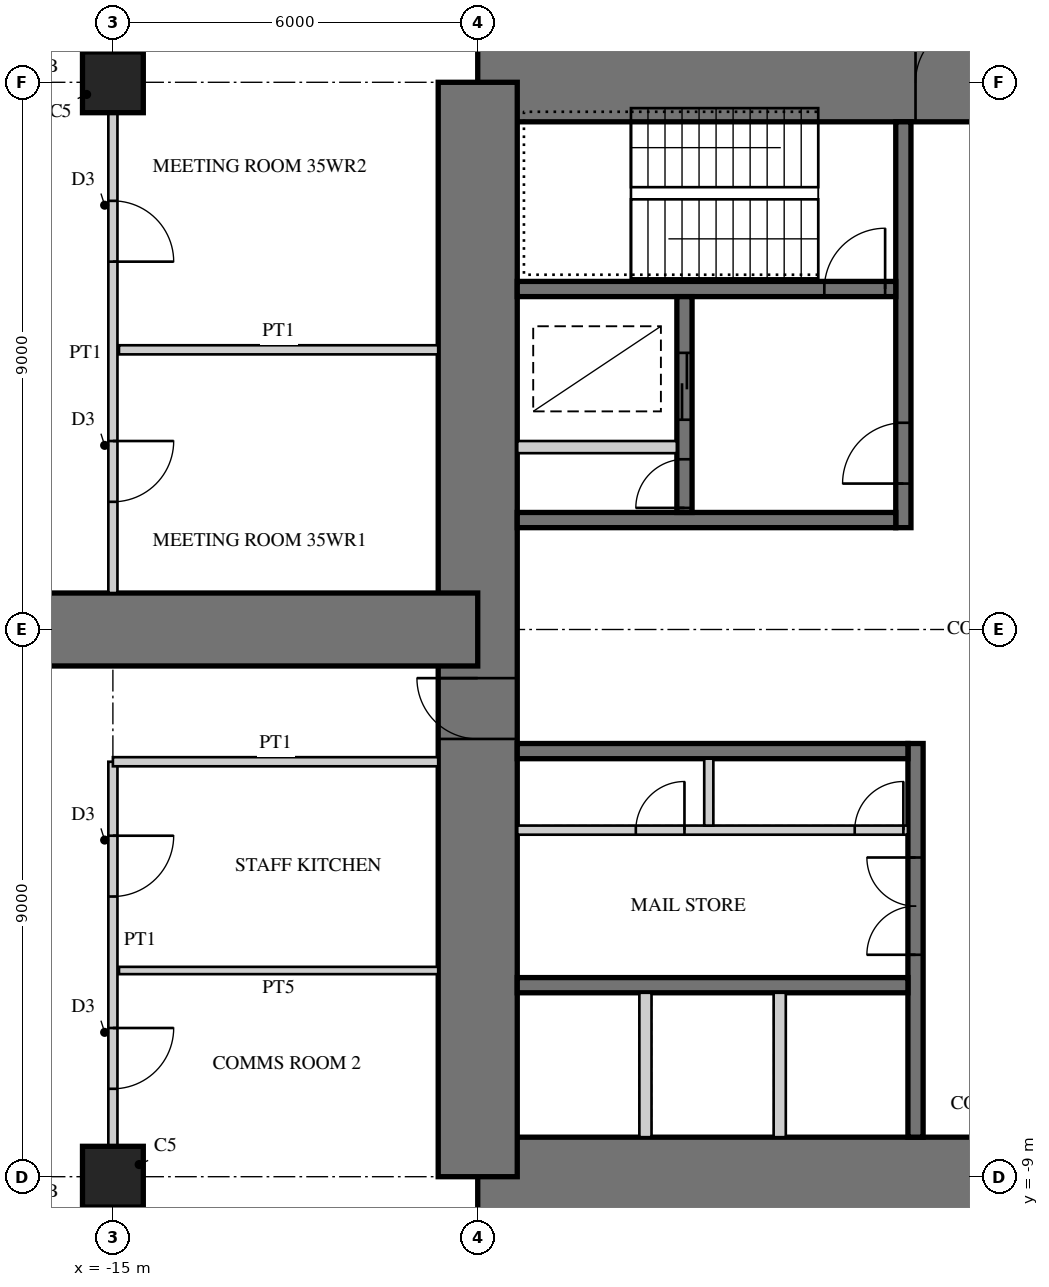
"""IFC4 building model, lengths in metres.
Left out: names, types, materials, properties, quantities, classifications, styles, units other than length and angle.
Written with IfcOpenShell. Run it as: python <this file> out.ifc"""

import sys

from ifc_helpers import new_model, si_unit, direction, frame, frame_2d, origin, origin_2d, place, context, subcontext, project, spatial, rectangle, extrude, element, fill, save


model = new_model("IFC4")
c1 = context("Model", 3, precision=1e-05, world=origin(), true_north=direction((0.0, 1.0)))
c2 = subcontext(c1, "Body", "Model", "MODEL_VIEW")
j1 = project(units=[si_unit("LENGTHUNIT", "METRE"), si_unit("PLANEANGLEUNIT", "RADIAN")], contexts=[c1])
p1 = place(None, origin())
s1 = spatial("IfcSite", under=j1, at=p1, CompositionType="ELEMENT")
p2 = place(p1, origin())
s2 = spatial("IfcBuilding", under=s1, at=p2, CompositionType="ELEMENT")
p3 = place(p2, frame((0.0, 0.0, 144.5)))
s3 = spatial("IfcBuildingStorey", under=s2, at=p3, CompositionType="ELEMENT", Elevation=144.5)
p4 = place(p3, frame((9.0, 9.0, 0.0), z_axis=(0.0, 0.0, 1.0), x_axis=(-1.0, 0.0, 0.0)))
e1 = element("IfcWall", 1, at=p4, inside=s3, PredefinedType="SHEAR", context=c2, shape_type="SweptSolid", body=[
    extrude(rectangle(XDim=18.0, YDim=1.3, at=frame_2d((9.0, 0.0))), origin(), (0.0, 0.0, 1.0), 4.0),
])
p5 = place(p4, frame((9.8, 0.0, 0.0)))
e2 = element("IfcOpeningElement", 2, at=p5, cuts=e1, PredefinedType="OPENING", context=c2, shape_type="SweptSolid", body=[
    extrude(rectangle(XDim=1.0, YDim=2.4, at=frame_2d((0.5, 1.2))), frame((0.0, 0.66, 0.0), z_axis=(0.0, -1.0, 0.0), x_axis=(1.0, 0.0, 0.0)), (0.0, 0.0, 1.0), 1.32),
])
p6 = place(p3, frame((-9.0, -9.0, 0.0), z_axis=(0.0, 0.0, 1.0), x_axis=(1.0, 0.0, 0.0)))
e3 = element("IfcWall", 3, at=p6, inside=s3, PredefinedType="SHEAR", context=c2, shape_type="SweptSolid", body=[
    extrude(rectangle(XDim=18.0, YDim=1.3, at=frame_2d((9.0, 0.0))), origin(), (0.0, 0.0, 1.0), 4.0),
])
p7 = place(p6, frame((9.8, 0.0, 0.0)))
e4 = element("IfcOpeningElement", 4, at=p7, cuts=e3, PredefinedType="OPENING", context=c2, shape_type="SweptSolid", body=[
    extrude(rectangle(XDim=1.0, YDim=2.4, at=frame_2d((0.5, 1.2))), frame((0.0, 0.66, 0.0), z_axis=(0.0, -1.0, 0.0), x_axis=(1.0, 0.0, 0.0)), (0.0, 0.0, 1.0), 1.32),
])
p8 = place(p3, frame((-9.0, 9.0, 0.0), z_axis=(0.0, 0.0, 1.0), x_axis=(0.0, -1.0, 0.0)))
e5 = element("IfcWall", 5, at=p8, inside=s3, PredefinedType="SHEAR", context=c2, shape_type="SweptSolid", body=[
    extrude(rectangle(XDim=18.0, YDim=1.3, at=frame_2d((9.0, 0.0))), origin(), (0.0, 0.0, 1.0), 4.0),
])
p9 = place(p8, frame((9.8, 0.0, 0.0)))
e6 = element("IfcOpeningElement", 6, at=p9, cuts=e5, PredefinedType="OPENING", context=c2, shape_type="SweptSolid", body=[
    extrude(rectangle(XDim=1.0, YDim=2.4, at=frame_2d((0.5, 1.2))), frame((0.0, 0.66, 0.0), z_axis=(0.0, -1.0, 0.0), x_axis=(1.0, 0.0, 0.0)), (0.0, 0.0, 1.0), 1.32),
])
p10 = place(p3, frame((-2.0, 1.675, 0.0), z_axis=(0.0, 0.0, 1.0), x_axis=(0.0, 1.0, 0.0)))
e7 = element("IfcWall", 7, at=p10, inside=s3, PredefinedType="SHEAR", context=c2, shape_type="SweptSolid", body=[
    extrude(rectangle(XDim=6.675, YDim=0.25, at=frame_2d((3.337, 0.0))), origin(), (0.0, 0.0, 1.0), 4.0),
])
p11 = place(p10, frame((0.725, 0.0, 0.0)))
e8 = element("IfcOpeningElement", 8, at=p11, cuts=e7, PredefinedType="OPENING", context=c2, shape_type="SweptSolid", body=[
    extrude(rectangle(XDim=1.0, YDim=2.1, at=frame_2d((0.5, 1.05))), frame((0.0, 0.135, 0.0), z_axis=(0.0, -1.0, 0.0), x_axis=(1.0, 0.0, 0.0)), (0.0, 0.0, 1.0), 0.27),
])
p12 = place(p3, frame((-2.125, 1.8, 0.0), z_axis=(0.0, 0.0, 1.0), x_axis=(-1.0, 0.0, 0.0)))
e9 = element("IfcWall", 9, at=p12, inside=s3, PredefinedType="SHEAR", context=c2, shape_type="SweptSolid", body=[
    extrude(rectangle(XDim=6.225, YDim=0.25, at=frame_2d((3.113, 0.0))), origin(), (0.0, 0.0, 1.0), 4.0),
])
p13 = place(p3, frame((-2.125, 5.6, 0.0), z_axis=(0.0, 0.0, 1.0), x_axis=(-1.0, 0.0, 0.0)))
e10 = element("IfcWall", 10, at=p13, inside=s3, PredefinedType="SHEAR", context=c2, shape_type="SweptSolid", body=[
    extrude(rectangle(XDim=6.225, YDim=0.25, at=frame_2d((3.113, 0.0))), origin(), (0.0, 0.0, 1.0), 4.0),
])
p14 = place(p13, frame((0.175, 0.0, 0.0)))
e11 = element("IfcOpeningElement", 11, at=p14, cuts=e10, PredefinedType="OPENING", context=c2, shape_type="SweptSolid", body=[
    extrude(rectangle(XDim=1.0, YDim=2.1, at=frame_2d((0.5, 1.05))), frame((0.0, 0.135, 0.0), z_axis=(0.0, -1.0, 0.0), x_axis=(1.0, 0.0, 0.0)), (0.0, 0.0, 1.0), 0.27),
])
p15 = place(p3, frame((-5.6, 1.925, 0.0), z_axis=(0.0, 0.0, 1.0), x_axis=(0.0, 1.0, 0.0)))
e12 = element("IfcWall", 12, at=p15, inside=s3, PredefinedType="SHEAR", context=c2, shape_type="SweptSolid", body=[
    extrude(rectangle(XDim=3.55, YDim=0.25, at=frame_2d((1.775, 0.0))), origin(), (0.0, 0.0, 1.0), 4.0),
])
p16 = place(p15, frame((1.525, 0.0, 0.0)))
e13 = element("IfcOpeningElement", 13, at=p16, cuts=e12, PredefinedType="OPENING", context=c2, shape_type="SweptSolid", body=[
    extrude(rectangle(XDim=1.1, YDim=2.2, at=frame_2d((0.55, 1.1))), frame((0.0, 0.135, 0.0), z_axis=(0.0, -1.0, 0.0), x_axis=(1.0, 0.0, 0.0)), (0.0, 0.0, 1.0), 0.27),
])
p17 = place(p15, frame((0.075, 0.0, 0.0)))
e14 = element("IfcOpeningElement", 14, at=p17, cuts=e12, PredefinedType="OPENING", context=c2, shape_type="SweptSolid", body=[
    extrude(rectangle(XDim=0.8, YDim=2.1, at=frame_2d((0.4, 1.05))), frame((0.0, 0.135, 0.0), z_axis=(0.0, -1.0, 0.0), x_axis=(1.0, 0.0, 0.0)), (0.0, 0.0, 1.0), 0.27),
])
p18 = place(p3, frame((-5.725, 3.0, 0.0), z_axis=(0.0, 0.0, 1.0), x_axis=(-1.0, 0.0, 0.0)))
e15 = element("IfcWall", 15, at=p18, inside=s3, PredefinedType="PARTITIONING", context=c2, shape_type="SweptSolid", body=[
    extrude(rectangle(XDim=2.625, YDim=0.2, at=frame_2d((1.312, 0.0))), origin(), (0.0, 0.0, 1.0), 4.0),
])
p19 = place(p3, frame((-1.8, -1.875, 0.0), z_axis=(0.0, 0.0, 1.0), x_axis=(0.0, -1.0, 0.0)))
e16 = element("IfcWall", 16, at=p19, inside=s3, PredefinedType="SHEAR", context=c2, shape_type="SweptSolid", body=[
    extrude(rectangle(XDim=6.475, YDim=0.25, at=frame_2d((3.238, 0.0))), origin(), (0.0, 0.0, 1.0), 4.0),
])
p20 = place(p19, frame((1.875, 0.0, 0.0)))
e17 = element("IfcOpeningElement", 17, at=p20, cuts=e16, PredefinedType="OPENING", context=c2, shape_type="SweptSolid", body=[
    extrude(rectangle(XDim=1.6, YDim=2.4, at=frame_2d((0.8, 1.2))), frame((0.0, 0.135, 0.0), z_axis=(0.0, -1.0, 0.0), x_axis=(1.0, 0.0, 0.0)), (0.0, 0.0, 1.0), 0.27),
])
for number, where, z_axis, x_axis in (
    (18, (-1.925, -2.0, 0.0), (0.0, 0.0, 1.0), (-1.0, 0.0, 0.0)),
    (19, (-1.925, -5.85, 0.0), (0.0, 0.0, 1.0), (-1.0, 0.0, 0.0)),
):
    element("IfcWall", number, at=place(p3, frame(where, z_axis=z_axis, x_axis=x_axis)), inside=s3, PredefinedType="SHEAR", context=c2, shape_type="SweptSolid", body=[
        extrude(rectangle(XDim=6.425, YDim=0.25, at=frame_2d((3.212, 0.0))), origin(), (0.0, 0.0, 1.0), 4.0),
    ])
p21 = place(p3, frame((-1.925, -3.3, 0.0), z_axis=(0.0, 0.0, 1.0), x_axis=(-1.0, 0.0, 0.0)))
e20 = element("IfcWall", 20, at=p21, inside=s3, PredefinedType="PARTITIONING", context=c2, shape_type="SweptSolid", body=[
    extrude(rectangle(XDim=6.425, YDim=0.15, at=frame_2d((3.212, 0.0))), origin(), (0.0, 0.0, 1.0), 4.0),
])
p22 = place(p21, frame((0.075, 0.0, 0.0)))
e21 = element("IfcOpeningElement", 21, at=p22, cuts=e20, PredefinedType="OPENING", context=c2, shape_type="SweptSolid", body=[
    extrude(rectangle(XDim=0.8, YDim=2.1, at=frame_2d((0.4, 1.05))), frame((0.0, 0.085, 0.0), z_axis=(0.0, -1.0, 0.0), x_axis=(1.0, 0.0, 0.0)), (0.0, 0.0, 1.0), 0.17),
])
p23 = place(p21, frame((3.675, 0.0, 0.0)))
e22 = element("IfcOpeningElement", 22, at=p23, cuts=e20, PredefinedType="OPENING", context=c2, shape_type="SweptSolid", body=[
    extrude(rectangle(XDim=0.8, YDim=2.1, at=frame_2d((0.4, 1.05))), frame((0.0, 0.085, 0.0), z_axis=(0.0, -1.0, 0.0), x_axis=(1.0, 0.0, 0.0)), (0.0, 0.0, 1.0), 0.17),
])
p24 = place(p3, frame((-5.2, -2.125, 0.0), z_axis=(0.0, 0.0, 1.0), x_axis=(0.0, -1.0, 0.0)))
e23 = element("IfcWall", 23, at=p24, inside=s3, PredefinedType="PARTITIONING", context=c2, shape_type="SweptSolid", body=[
    extrude(rectangle(XDim=1.1, YDim=0.15, at=frame_2d((0.55, 0.0))), origin(), (0.0, 0.0, 1.0), 4.0),
])
for number, where, z_axis, x_axis in (
    (24, (-4.033, -5.975, 0.0), (0.0, 0.0, 1.0), (0.0, -1.0, 0.0)),
    (25, (-6.242, -5.975, 0.0), (0.0, 0.0, 1.0), (0.0, -1.0, 0.0)),
):
    element("IfcWall", number, at=place(p3, frame(where, z_axis=z_axis, x_axis=x_axis)), inside=s3, PredefinedType="PARTITIONING", context=c2, shape_type="SweptSolid", body=[
        extrude(rectangle(XDim=2.375, YDim=0.2, at=frame_2d((1.188, 0.0))), origin(), (0.0, 0.0, 1.0), 4.0),
    ])
p25 = place(p3, frame((-9.0, 0.0, 0.0), z_axis=(0.0, 0.0, 1.0), x_axis=(-1.0, 0.0, 0.0)))
e26 = element("IfcWall", 26, at=p25, inside=s3, PredefinedType="SHEAR", context=c2, shape_type="SweptSolid", body=[
    extrude(rectangle(XDim=18.0, YDim=1.2, at=frame_2d((9.0, 0.0))), origin(), (0.0, 0.0, 1.0), 4.0),
])
p26 = place(p25, frame((9.8, 0.0, 0.0)))
e27 = element("IfcOpeningElement", 27, at=p26, cuts=e26, PredefinedType="OPENING", context=c2, shape_type="SweptSolid", body=[
    extrude(rectangle(XDim=1.0, YDim=2.2, at=frame_2d((0.5, 1.1))), frame((0.0, 0.61, 0.0), z_axis=(0.0, -1.0, 0.0), x_axis=(1.0, 0.0, 0.0)), (0.0, 0.0, 1.0), 1.22),
])
for number, where, z_axis, x_axis in (
    (28, (-15.0, 9.0, 0.0), (0.0, 0.0, 1.0), (1.0, 0.0, 0.0)),
    (29, (-15.0, -9.0, 0.0), (0.0, 0.0, 1.0), (1.0, 0.0, 0.0)),
):
    element("IfcColumn", number, at=place(p3, frame(where, z_axis=z_axis, x_axis=x_axis)), inside=s3, PredefinedType="COLUMN", context=c2, shape_type="SweptSolid", body=[
        extrude(rectangle(XDim=1.0, YDim=1.0, at=origin_2d()), origin(), (0.0, 0.0, 1.0), 4.0),
    ])
p27 = place(p3, frame((-15.0, -2.175, 0.0), z_axis=(0.0, 0.0, 1.0), x_axis=(0.0, -1.0, 0.0)))
e30 = element("IfcWall", 30, at=p27, inside=s3, PredefinedType="PARTITIONING", context=c2, shape_type="SweptSolid", body=[
    extrude(rectangle(XDim=6.325, YDim=0.15, at=frame_2d((3.163, 0.0))), origin(), (0.0, 0.0, 1.0), 3.0),
])
p28 = place(p27, frame((1.217, 0.0, 0.0)))
e31 = element("IfcOpeningElement", 31, at=p28, cuts=e30, PredefinedType="OPENING", context=c2, shape_type="SweptSolid", body=[
    extrude(rectangle(XDim=1.0, YDim=2.1, at=frame_2d((0.5, 1.05))), frame((0.0, 0.085, 0.0), z_axis=(0.0, -1.0, 0.0), x_axis=(1.0, 0.0, 0.0)), (0.0, 0.0, 1.0), 0.17),
])
p29 = place(p27, frame((4.379, 0.0, 0.0)))
e32 = element("IfcOpeningElement", 32, at=p29, cuts=e30, PredefinedType="OPENING", context=c2, shape_type="SweptSolid", body=[
    extrude(rectangle(XDim=1.0, YDim=2.1, at=frame_2d((0.5, 1.05))), frame((0.0, 0.085, 0.0), z_axis=(0.0, -1.0, 0.0), x_axis=(1.0, 0.0, 0.0)), (0.0, 0.0, 1.0), 0.17),
])
p30 = place(p3, frame((-9.65, -2.175, 0.0), z_axis=(0.0, 0.0, 1.0), x_axis=(-1.0, 0.0, 0.0)))
e33 = element("IfcWall", 33, at=p30, inside=s3, PredefinedType="PARTITIONING", context=c2, shape_type="SweptSolid", body=[
    extrude(rectangle(XDim=5.35, YDim=0.15, at=frame_2d((2.675, 0.0))), origin(), (0.0, 0.0, 1.0), 3.8),
])
p31 = place(p3, frame((-9.65, -5.609, 0.0), z_axis=(0.0, 0.0, 1.0), x_axis=(-1.0, 0.0, 0.0)))
e34 = element("IfcWall", 34, at=p31, inside=s3, PredefinedType="PLUMBINGWALL", context=c2, shape_type="SweptSolid", body=[
    extrude(rectangle(XDim=5.25, YDim=0.12, at=frame_2d((2.625, 0.0))), origin(), (0.0, 0.0, 1.0), 3.8),
])
p32 = place(p3, frame((-15.0, 8.5, 0.0), z_axis=(0.0, 0.0, 1.0), x_axis=(0.0, -1.0, 0.0)))
e35 = element("IfcWall", 35, at=p32, inside=s3, PredefinedType="PARTITIONING", context=c2, shape_type="SweptSolid", body=[
    extrude(rectangle(XDim=7.9, YDim=0.15, at=frame_2d((3.95, 0.0))), origin(), (0.0, 0.0, 1.0), 3.0),
])
p33 = place(p32, frame((1.45, 0.0, 0.0)))
e36 = element("IfcOpeningElement", 36, at=p33, cuts=e35, PredefinedType="OPENING", context=c2, shape_type="SweptSolid", body=[
    extrude(rectangle(XDim=1.0, YDim=2.1, at=frame_2d((0.5, 1.05))), frame((0.0, 0.085, 0.0), z_axis=(0.0, -1.0, 0.0), x_axis=(1.0, 0.0, 0.0)), (0.0, 0.0, 1.0), 0.17),
])
p34 = place(p32, frame((5.4, 0.0, 0.0)))
e37 = element("IfcOpeningElement", 37, at=p34, cuts=e35, PredefinedType="OPENING", context=c2, shape_type="SweptSolid", body=[
    extrude(rectangle(XDim=1.0, YDim=2.1, at=frame_2d((0.5, 1.05))), frame((0.0, 0.085, 0.0), z_axis=(0.0, -1.0, 0.0), x_axis=(1.0, 0.0, 0.0)), (0.0, 0.0, 1.0), 0.17),
])
p35 = place(p3, frame((-9.65, 4.6, 0.0), z_axis=(0.0, 0.0, 1.0), x_axis=(-1.0, 0.0, 0.0)))
e38 = element("IfcWall", 38, at=p35, inside=s3, PredefinedType="PARTITIONING", context=c2, shape_type="SweptSolid", body=[
    extrude(rectangle(XDim=5.25, YDim=0.15, at=frame_2d((2.625, 0.0))), origin(), (0.0, 0.0, 1.0), 3.8),
])
p36 = place(p28, origin())
e39 = element("IfcDoor", 39, at=p36, inside=s3, OperationType="SINGLE_SWING_LEFT", PredefinedType="DOOR", context=c2, shape_type="SweptSolid", body=[
    extrude(rectangle(XDim=1.0, YDim=2.1, at=frame_2d((0.5, 1.05))), frame((0.0, 0.025, 0.0), z_axis=(0.0, -1.0, 0.0), x_axis=(1.0, 0.0, 0.0)), (0.0, 0.0, 1.0), 0.05),
])
fill(e31, e39)
p37 = place(p29, origin())
e40 = element("IfcDoor", 40, at=p37, inside=s3, OperationType="SINGLE_SWING_LEFT", PredefinedType="DOOR", context=c2, shape_type="SweptSolid", body=[
    extrude(rectangle(XDim=1.0, YDim=2.1, at=frame_2d((0.5, 1.05))), frame((0.0, 0.025, 0.0), z_axis=(0.0, -1.0, 0.0), x_axis=(1.0, 0.0, 0.0)), (0.0, 0.0, 1.0), 0.05),
])
fill(e32, e40)
p38 = place(p33, origin())
e41 = element("IfcDoor", 41, at=p38, inside=s3, OperationType="SINGLE_SWING_RIGHT", PredefinedType="DOOR", context=c2, shape_type="SweptSolid", body=[
    extrude(rectangle(XDim=1.0, YDim=2.1, at=frame_2d((0.5, 1.05))), frame((0.0, 0.025, 0.0), z_axis=(0.0, -1.0, 0.0), x_axis=(1.0, 0.0, 0.0)), (0.0, 0.0, 1.0), 0.05),
])
fill(e36, e41)
p39 = place(p34, origin())
e42 = element("IfcDoor", 42, at=p39, inside=s3, OperationType="SINGLE_SWING_LEFT", PredefinedType="DOOR", context=c2, shape_type="SweptSolid", body=[
    extrude(rectangle(XDim=1.0, YDim=2.1, at=frame_2d((0.5, 1.05))), frame((0.0, 0.025, 0.0), z_axis=(0.0, -1.0, 0.0), x_axis=(1.0, 0.0, 0.0)), (0.0, 0.0, 1.0), 0.05),
])
fill(e37, e42)
p40 = place(p5, frame((1.0, 0.0, 0.0), z_axis=(0.0, 0.0, 1.0), x_axis=(-1.0, 0.0, 0.0)))
e43 = element("IfcDoor", 43, at=p40, inside=s3, OperationType="SINGLE_SWING_RIGHT", PredefinedType="DOOR", context=c2, shape_type="SweptSolid", body=[
    extrude(rectangle(XDim=1.0, YDim=2.4, at=frame_2d((0.5, 1.2))), frame((0.0, -0.005, 0.0), z_axis=(0.0, -1.0, 0.0), x_axis=(1.0, 0.0, 0.0)), (0.0, 0.0, 1.0), 0.05),
])
fill(e2, e43)
p41 = place(p9, frame((1.0, 0.0, 0.0), z_axis=(0.0, 0.0, 1.0), x_axis=(-1.0, 0.0, 0.0)))
e44 = element("IfcDoor", 44, at=p41, inside=s3, OperationType="SINGLE_SWING_RIGHT", PredefinedType="DOOR", context=c2, shape_type="SweptSolid", body=[
    extrude(rectangle(XDim=1.0, YDim=2.4, at=frame_2d((0.5, 1.2))), frame((0.0, -0.005, 0.0), z_axis=(0.0, -1.0, 0.0), x_axis=(1.0, 0.0, 0.0)), (0.0, 0.0, 1.0), 0.05),
])
fill(e6, e44)
p42 = place(p11, origin())
e45 = element("IfcDoor", 45, at=p42, inside=s3, OperationType="SINGLE_SWING_LEFT", PredefinedType="DOOR", context=c2, shape_type="SweptSolid", body=[
    extrude(rectangle(XDim=1.0, YDim=2.1, at=frame_2d((0.5, 1.05))), frame((0.0, 0.025, 0.0), z_axis=(0.0, -1.0, 0.0), x_axis=(1.0, 0.0, 0.0)), (0.0, 0.0, 1.0), 0.05),
])
fill(e8, e45)
p43 = place(p14, frame((1.0, 0.0, 0.0), z_axis=(0.0, 0.0, 1.0), x_axis=(-1.0, 0.0, 0.0)))
e46 = element("IfcDoor", 46, at=p43, inside=s3, OperationType="SINGLE_SWING_RIGHT", PredefinedType="DOOR", context=c2, shape_type="SweptSolid", body=[
    extrude(rectangle(XDim=1.0, YDim=2.1, at=frame_2d((0.5, 1.05))), frame((0.0, 0.025, 0.0), z_axis=(0.0, -1.0, 0.0), x_axis=(1.0, 0.0, 0.0)), (0.0, 0.0, 1.0), 0.05),
])
fill(e11, e46)
p44 = place(p16, origin())
e47 = element("IfcDoor", 47, at=p44, inside=s3, OperationType="DOUBLE_DOOR_SLIDING", PredefinedType="DOOR", context=c2, shape_type="SweptSolid", body=[
    extrude(rectangle(XDim=1.1, YDim=2.2, at=frame_2d((0.55, 1.1))), frame((0.0, 0.025, 0.0), z_axis=(0.0, -1.0, 0.0), x_axis=(1.0, 0.0, 0.0)), (0.0, 0.0, 1.0), 0.05),
])
fill(e13, e47)
p45 = place(p17, origin())
e48 = element("IfcDoor", 48, at=p45, inside=s3, OperationType="SINGLE_SWING_LEFT", PredefinedType="DOOR", context=c2, shape_type="SweptSolid", body=[
    extrude(rectangle(XDim=0.8, YDim=2.1, at=frame_2d((0.4, 1.05))), frame((0.0, 0.025, 0.0), z_axis=(0.0, -1.0, 0.0), x_axis=(1.0, 0.0, 0.0)), (0.0, 0.0, 1.0), 0.05),
])
fill(e14, e48)
p46 = place(p20, frame((1.6, 0.0, 0.0), z_axis=(0.0, 0.0, 1.0), x_axis=(-1.0, 0.0, 0.0)))
e49 = element("IfcDoor", 49, at=p46, inside=s3, OperationType="DOUBLE_DOOR_SINGLE_SWING", PredefinedType="DOOR", context=c2, shape_type="SweptSolid", body=[
    extrude(rectangle(XDim=1.6, YDim=2.4, at=frame_2d((0.8, 1.2))), frame((0.0, 0.025, 0.0), z_axis=(0.0, -1.0, 0.0), x_axis=(1.0, 0.0, 0.0)), (0.0, 0.0, 1.0), 0.05),
])
fill(e17, e49)
p47 = place(p22, frame((0.8, 0.0, 0.0), z_axis=(0.0, 0.0, 1.0), x_axis=(-1.0, 0.0, 0.0)))
e50 = element("IfcDoor", 50, at=p47, inside=s3, OperationType="SINGLE_SWING_RIGHT", PredefinedType="DOOR", context=c2, shape_type="SweptSolid", body=[
    extrude(rectangle(XDim=0.8, YDim=2.1, at=frame_2d((0.4, 1.05))), frame((0.0, 0.025, 0.0), z_axis=(0.0, -1.0, 0.0), x_axis=(1.0, 0.0, 0.0)), (0.0, 0.0, 1.0), 0.05),
])
fill(e21, e50)
p48 = place(p23, frame((0.8, 0.0, 0.0), z_axis=(0.0, 0.0, 1.0), x_axis=(-1.0, 0.0, 0.0)))
e51 = element("IfcDoor", 51, at=p48, inside=s3, OperationType="SINGLE_SWING_RIGHT", PredefinedType="DOOR", context=c2, shape_type="SweptSolid", body=[
    extrude(rectangle(XDim=0.8, YDim=2.1, at=frame_2d((0.4, 1.05))), frame((0.0, 0.025, 0.0), z_axis=(0.0, -1.0, 0.0), x_axis=(1.0, 0.0, 0.0)), (0.0, 0.0, 1.0), 0.05),
])
fill(e22, e51)
save(model, sys.argv[1])
